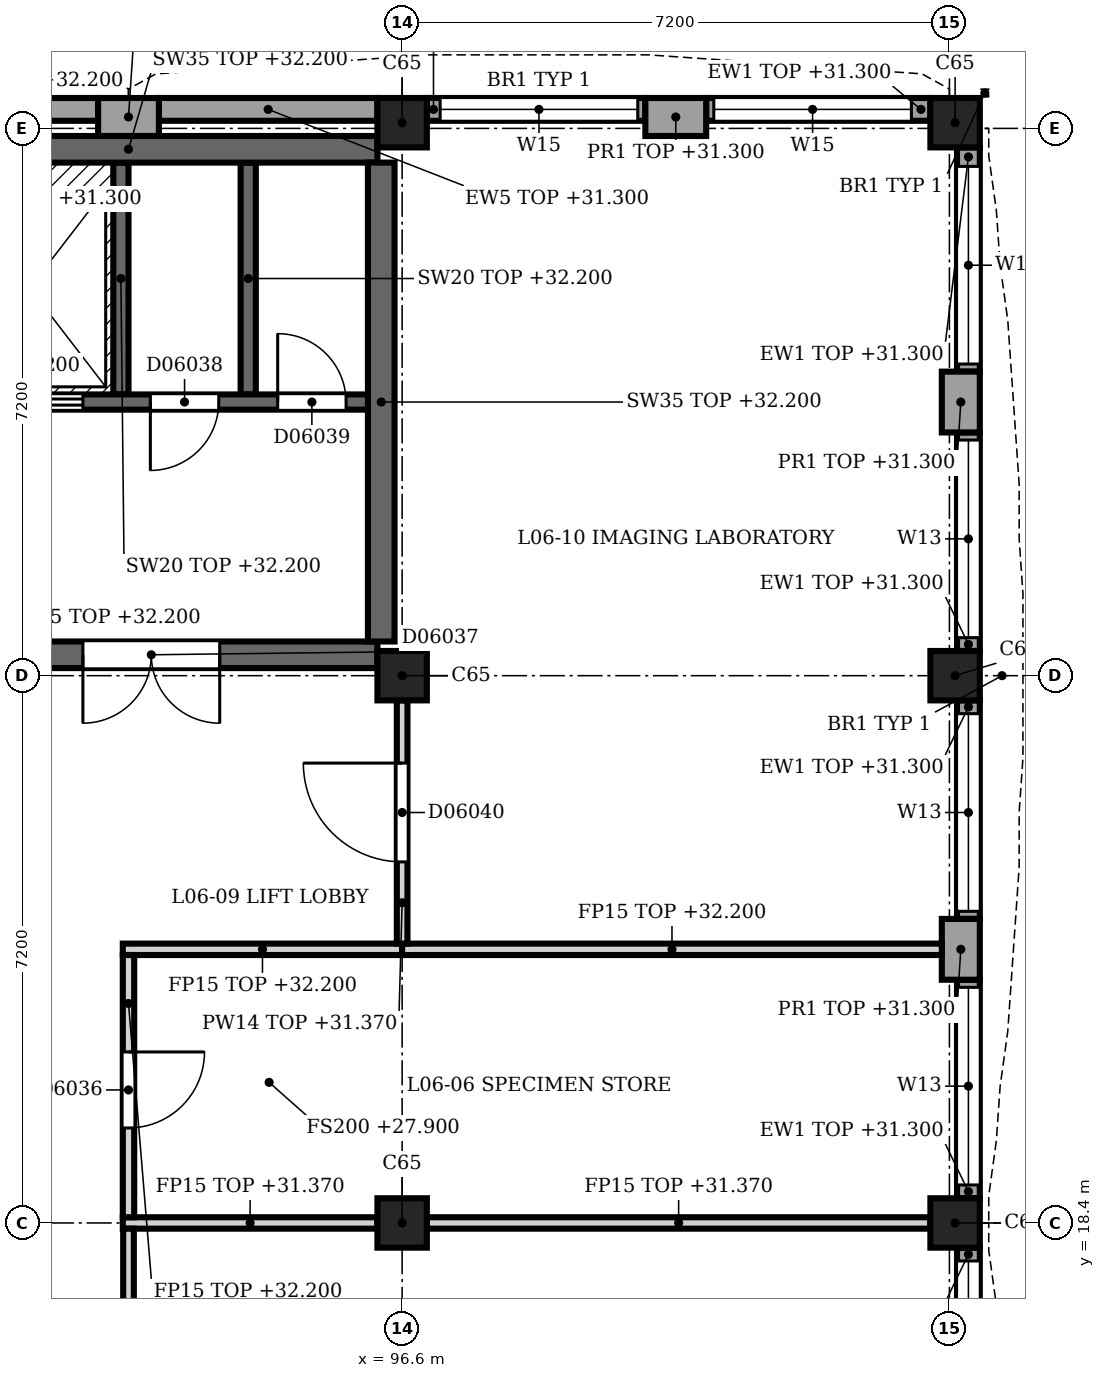
"""IFC4 building model, lengths in metres.
Left out: names, types, materials, properties, quantities, classifications, styles, units other than length and angle.
Written with IfcOpenShell. Run it as: python <this file> out.ifc"""

import sys

from ifc_helpers import new_model, si_unit, direction, frame, frame_2d, origin, origin_2d, place, context, subcontext, project, spatial, rectangle, extrude, element, fill, save


model = new_model("IFC4")
c1 = context("Model", 3, precision=1e-05, world=origin(), true_north=direction((0.0, 1.0)))
c2 = subcontext(c1, "Body", "Model", "MODEL_VIEW")
j1 = project(units=[si_unit("LENGTHUNIT", "METRE"), si_unit("PLANEANGLEUNIT", "RADIAN")], contexts=[c1])
p1 = place(None, origin())
s1 = spatial("IfcSite", under=j1, at=p1, CompositionType="ELEMENT")
p2 = place(p1, origin())
s2 = spatial("IfcBuilding", under=s1, at=p2, CompositionType="ELEMENT")
p3 = place(p2, frame((0.0, 0.0, 27.9)))
s3 = spatial("IfcBuildingStorey", under=s2, at=p3, CompositionType="ELEMENT", Elevation=27.9)
for number, where, z_axis, x_axis in (
    (1, (96.6, 18.4, 0.0), (0.0, 0.0, 1.0), (1.0, 0.0, 0.0)),
    (2, (96.6, 25.6, 0.0), (0.0, 0.0, 1.0), (1.0, 0.0, 0.0)),
    (3, (96.6, 32.875, 0.0), (0.0, 0.0, 1.0), (1.0, 0.0, 0.0)),
    (4, (103.875, 18.4, 0.0), (0.0, 0.0, 1.0), (1.0, 0.0, 0.0)),
    (5, (103.875, 25.6, 0.0), (0.0, 0.0, 1.0), (1.0, 0.0, 0.0)),
    (6, (103.875, 32.875, 0.0), (0.0, 0.0, 1.0), (1.0, 0.0, 0.0)),
):
    element("IfcColumn", number, at=place(p3, frame(where, z_axis=z_axis, x_axis=x_axis)), inside=s3, PredefinedType="COLUMN", context=c2, shape_type="SweptSolid", body=[
        extrude(rectangle(XDim=0.65, YDim=0.65, at=origin_2d()), origin(), (0.0, 0.0, 1.0), 4.5),
    ])
p4 = place(p3, frame((92.6, 32.95, 0.0), z_axis=(0.0, 0.0, 1.0), x_axis=(1.0, 0.0, 0.0)))
e7 = element("IfcWall", 7, at=p4, inside=s3, PredefinedType="SOLIDWALL", context=c2, shape_type="SweptSolid", body=[
    extrude(rectangle(XDim=0.8, YDim=0.5, at=frame_2d((0.4, 0.0))), origin(), (0.0, 0.0, 1.0), 3.4),
])
p5 = place(p3, frame((99.8, 32.95, 0.0), z_axis=(0.0, 0.0, 1.0), x_axis=(1.0, 0.0, 0.0)))
e8 = element("IfcWall", 8, at=p5, inside=s3, PredefinedType="SOLIDWALL", context=c2, shape_type="SweptSolid", body=[
    extrude(rectangle(XDim=0.8, YDim=0.5, at=frame_2d((0.4, 0.0))), origin(), (0.0, 0.0, 1.0), 3.4),
])
for number, where, z_axis, x_axis in (
    (9, (89.725, 33.05, 0.0), (0.0, 0.0, 1.0), (1.0, 0.0, 0.0)),
    (10, (93.4, 33.05, 0.0), (0.0, 0.0, 1.0), (1.0, 0.0, 0.0)),
):
    element("IfcWall", number, at=place(p3, frame(where, z_axis=z_axis, x_axis=x_axis)), inside=s3, PredefinedType="SOLIDWALL", context=c2, shape_type="SweptSolid", body=[
        extrude(rectangle(XDim=2.875, YDim=0.3, at=frame_2d((1.438, 0.0))), origin(), (0.0, 0.0, 1.0), 3.4),
    ])
p6 = place(p3, frame((96.925, 33.05, 0.0), z_axis=(0.0, 0.0, 1.0), x_axis=(1.0, 0.0, 0.0)))
e11 = element("IfcWall", 11, at=p6, inside=s3, PredefinedType="SOLIDWALL", context=c2, shape_type="SweptSolid", body=[
    extrude(rectangle(XDim=2.875, YDim=0.3, at=frame_2d((1.438, 0.0))), origin(), (0.0, 0.0, 1.0), 3.4),
])
p7 = place(p6, frame((0.175, 0.0, 1.0)))
e12 = element("IfcOpeningElement", 12, at=p7, cuts=e11, PredefinedType="OPENING", context=c2, shape_type="SweptSolid", body=[
    extrude(rectangle(XDim=2.6, YDim=2.0, at=frame_2d((1.3, 1.0))), frame((0.0, 0.16, 0.0), z_axis=(0.0, -1.0, 0.0), x_axis=(1.0, 0.0, 0.0)), (0.0, 0.0, 1.0), 0.32),
])
p8 = place(p3, frame((100.6, 33.05, 0.0), z_axis=(0.0, 0.0, 1.0), x_axis=(1.0, 0.0, 0.0)))
e13 = element("IfcWall", 13, at=p8, inside=s3, PredefinedType="SOLIDWALL", context=c2, shape_type="SweptSolid", body=[
    extrude(rectangle(XDim=2.95, YDim=0.3, at=frame_2d((1.475, 0.0))), origin(), (0.0, 0.0, 1.0), 3.4),
])
p9 = place(p8, frame((0.1, 0.0, 1.0)))
e14 = element("IfcOpeningElement", 14, at=p9, cuts=e13, PredefinedType="OPENING", context=c2, shape_type="SweptSolid", body=[
    extrude(rectangle(XDim=2.6, YDim=2.0, at=frame_2d((1.3, 1.0))), frame((0.0, 0.16, 0.0), z_axis=(0.0, -1.0, 0.0), x_axis=(1.0, 0.0, 0.0)), (0.0, 0.0, 1.0), 0.32),
])
p10 = place(p3, frame((103.95, 29.6, 0.0), z_axis=(0.0, 0.0, 1.0), x_axis=(0.0, -1.0, 0.0)))
e15 = element("IfcWall", 15, at=p10, inside=s3, PredefinedType="SOLIDWALL", context=c2, shape_type="SweptSolid", body=[
    extrude(rectangle(XDim=0.8, YDim=0.5, at=frame_2d((0.4, 0.0))), origin(), (0.0, 0.0, 1.0), 3.4),
])
p11 = place(p3, frame((103.95, 22.4, 0.0), z_axis=(0.0, 0.0, 1.0), x_axis=(0.0, -1.0, 0.0)))
e16 = element("IfcWall", 16, at=p11, inside=s3, PredefinedType="SOLIDWALL", context=c2, shape_type="SweptSolid", body=[
    extrude(rectangle(XDim=0.8, YDim=0.5, at=frame_2d((0.4, 0.0))), origin(), (0.0, 0.0, 1.0), 3.4),
])
p12 = place(p3, frame((104.05, 32.55, 0.0), z_axis=(0.0, 0.0, 1.0), x_axis=(0.0, -1.0, 0.0)))
e17 = element("IfcWall", 17, at=p12, inside=s3, PredefinedType="SOLIDWALL", context=c2, shape_type="SweptSolid", body=[
    extrude(rectangle(XDim=2.95, YDim=0.3, at=frame_2d((1.475, 0.0))), origin(), (0.0, 0.0, 1.0), 3.4),
])
p13 = place(p12, frame((0.25, 0.0, 0.9)))
e18 = element("IfcOpeningElement", 18, at=p13, cuts=e17, PredefinedType="OPENING", context=c2, shape_type="SweptSolid", body=[
    extrude(rectangle(XDim=2.6, YDim=2.2, at=frame_2d((1.3, 1.1))), frame((0.0, 0.16, 0.0), z_axis=(0.0, -1.0, 0.0), x_axis=(1.0, 0.0, 0.0)), (0.0, 0.0, 1.0), 0.32),
])
p14 = place(p3, frame((104.05, 28.8, 0.0), z_axis=(0.0, 0.0, 1.0), x_axis=(0.0, -1.0, 0.0)))
e19 = element("IfcWall", 19, at=p14, inside=s3, PredefinedType="SOLIDWALL", context=c2, shape_type="SweptSolid", body=[
    extrude(rectangle(XDim=2.875, YDim=0.3, at=frame_2d((1.438, 0.0))), origin(), (0.0, 0.0, 1.0), 3.4),
])
p15 = place(p14, frame((0.1, 0.0, 0.9)))
e20 = element("IfcOpeningElement", 20, at=p15, cuts=e19, PredefinedType="OPENING", context=c2, shape_type="SweptSolid", body=[
    extrude(rectangle(XDim=2.6, YDim=2.2, at=frame_2d((1.3, 1.1))), frame((0.0, 0.16, 0.0), z_axis=(0.0, -1.0, 0.0), x_axis=(1.0, 0.0, 0.0)), (0.0, 0.0, 1.0), 0.32),
])
p16 = place(p3, frame((104.05, 25.275, 0.0), z_axis=(0.0, 0.0, 1.0), x_axis=(0.0, -1.0, 0.0)))
e21 = element("IfcWall", 21, at=p16, inside=s3, PredefinedType="SOLIDWALL", context=c2, shape_type="SweptSolid", body=[
    extrude(rectangle(XDim=2.875, YDim=0.3, at=frame_2d((1.438, 0.0))), origin(), (0.0, 0.0, 1.0), 3.4),
])
p17 = place(p16, frame((0.175, 0.0, 0.9)))
e22 = element("IfcOpeningElement", 22, at=p17, cuts=e21, PredefinedType="OPENING", context=c2, shape_type="SweptSolid", body=[
    extrude(rectangle(XDim=2.6, YDim=2.2, at=frame_2d((1.3, 1.1))), frame((0.0, 0.16, 0.0), z_axis=(0.0, -1.0, 0.0), x_axis=(1.0, 0.0, 0.0)), (0.0, 0.0, 1.0), 0.32),
])
p18 = place(p3, frame((104.05, 21.6, 0.0), z_axis=(0.0, 0.0, 1.0), x_axis=(0.0, -1.0, 0.0)))
e23 = element("IfcWall", 23, at=p18, inside=s3, PredefinedType="SOLIDWALL", context=c2, shape_type="SweptSolid", body=[
    extrude(rectangle(XDim=2.875, YDim=0.3, at=frame_2d((1.438, 0.0))), origin(), (0.0, 0.0, 1.0), 3.4),
])
p19 = place(p18, frame((0.1, 0.0, 0.9)))
e24 = element("IfcOpeningElement", 24, at=p19, cuts=e23, PredefinedType="OPENING", context=c2, shape_type="SweptSolid", body=[
    extrude(rectangle(XDim=2.6, YDim=2.2, at=frame_2d((1.3, 1.1))), frame((0.0, 0.16, 0.0), z_axis=(0.0, -1.0, 0.0), x_axis=(1.0, 0.0, 0.0)), (0.0, 0.0, 1.0), 0.32),
])
p20 = place(p3, frame((104.05, 18.075, 0.0), z_axis=(0.0, 0.0, 1.0), x_axis=(0.0, -1.0, 0.0)))
e25 = element("IfcWall", 25, at=p20, inside=s3, PredefinedType="SOLIDWALL", context=c2, shape_type="SweptSolid", body=[
    extrude(rectangle(XDim=2.875, YDim=0.3, at=frame_2d((1.438, 0.0))), origin(), (0.0, 0.0, 1.0), 3.4),
])
p21 = place(p20, frame((0.175, 0.0, 0.9)))
e26 = element("IfcOpeningElement", 26, at=p21, cuts=e25, PredefinedType="OPENING", context=c2, shape_type="SweptSolid", body=[
    extrude(rectangle(XDim=2.6, YDim=2.2, at=frame_2d((1.3, 1.1))), frame((0.0, 0.16, 0.0), z_axis=(0.0, -1.0, 0.0), x_axis=(1.0, 0.0, 0.0)), (0.0, 0.0, 1.0), 0.32),
])
p22 = place(p3, frame((89.725, 25.875, 0.0), z_axis=(0.0, 0.0, 1.0), x_axis=(1.0, 0.0, 0.0)))
e27 = element("IfcWall", 27, at=p22, inside=s3, PredefinedType="SHEAR", context=c2, shape_type="SweptSolid", body=[
    extrude(rectangle(XDim=6.55, YDim=0.35, at=frame_2d((3.275, 0.0))), origin(), (0.0, 0.0, 1.0), 4.3),
])
p23 = place(p22, frame((2.675, 0.0, 0.0)))
e28 = element("IfcOpeningElement", 28, at=p23, cuts=e27, PredefinedType="OPENING", context=c2, shape_type="SweptSolid", body=[
    extrude(rectangle(XDim=1.8, YDim=2.1, at=frame_2d((0.9, 1.05))), frame((0.0, 0.185, 0.0), z_axis=(0.0, -1.0, 0.0), x_axis=(1.0, 0.0, 0.0)), (0.0, 0.0, 1.0), 0.37),
])
p24 = place(p3, frame((89.725, 32.525, 0.0), z_axis=(0.0, 0.0, 1.0), x_axis=(1.0, 0.0, 0.0)))
e29 = element("IfcWall", 29, at=p24, inside=s3, PredefinedType="SHEAR", context=c2, shape_type="SweptSolid", body=[
    extrude(rectangle(XDim=6.55, YDim=0.35, at=frame_2d((3.275, 0.0))), origin(), (0.0, 0.0, 1.0), 4.3),
])
p25 = place(p3, frame((96.325, 26.05, 0.0), z_axis=(0.0, 0.0, 1.0), x_axis=(0.0, 1.0, 0.0)))
e30 = element("IfcWall", 30, at=p25, inside=s3, PredefinedType="SHEAR", context=c2, shape_type="SweptSolid", body=[
    extrude(rectangle(XDim=6.3, YDim=0.35, at=frame_2d((3.15, 0.0))), origin(), (0.0, 0.0, 1.0), 4.3),
])
p26 = place(p3, frame((96.15, 29.2, 0.0), z_axis=(0.0, 0.0, 1.0), x_axis=(-1.0, 0.0, 0.0)))
e31 = element("IfcWall", 31, at=p26, inside=s3, PredefinedType="SHEAR", context=c2, shape_type="SweptSolid", body=[
    extrude(rectangle(XDim=10.35, YDim=0.2, at=frame_2d((5.175, 0.0))), origin(), (0.0, 0.0, 1.0), 4.3),
])
p27 = place(p26, frame((8.8, 0.0, 0.0)))
e32 = element("IfcOpeningElement", 32, at=p27, cuts=e31, PredefinedType="OPENING", context=c2, shape_type="SweptSolid", body=[
    extrude(rectangle(XDim=1.1, YDim=2.1, at=frame_2d((0.55, 1.05))), frame((0.0, 0.11, 0.0), z_axis=(0.0, -1.0, 0.0), x_axis=(1.0, 0.0, 0.0)), (0.0, 0.0, 1.0), 0.22),
])
p28 = place(p26, frame((6.6, 0.0, 0.0)))
e33 = element("IfcOpeningElement", 33, at=p28, cuts=e31, PredefinedType="OPENING", context=c2, shape_type="SweptSolid", body=[
    extrude(rectangle(XDim=1.1, YDim=2.1, at=frame_2d((0.55, 1.05))), frame((0.0, 0.11, 0.0), z_axis=(0.0, -1.0, 0.0), x_axis=(1.0, 0.0, 0.0)), (0.0, 0.0, 1.0), 0.22),
])
p29 = place(p26, frame((3.75, 0.0, 0.0)))
e34 = element("IfcOpeningElement", 34, at=p29, cuts=e31, PredefinedType="OPENING", context=c2, shape_type="SweptSolid", body=[
    extrude(rectangle(XDim=1.4, YDim=2.1, at=frame_2d((0.7, 1.05))), frame((0.0, 0.11, 0.0), z_axis=(0.0, -1.0, 0.0), x_axis=(1.0, 0.0, 0.0)), (0.0, 0.0, 1.0), 0.22),
])
p30 = place(p26, frame((1.962, 0.0, 0.0)))
e35 = element("IfcOpeningElement", 35, at=p30, cuts=e31, PredefinedType="OPENING", context=c2, shape_type="SweptSolid", body=[
    extrude(rectangle(XDim=0.9, YDim=2.1, at=frame_2d((0.45, 1.05))), frame((0.0, 0.11, 0.0), z_axis=(0.0, -1.0, 0.0), x_axis=(1.0, 0.0, 0.0)), (0.0, 0.0, 1.0), 0.22),
])
p31 = place(p26, frame((0.288, 0.0, 0.0)))
e36 = element("IfcOpeningElement", 36, at=p31, cuts=e31, PredefinedType="OPENING", context=c2, shape_type="SweptSolid", body=[
    extrude(rectangle(XDim=0.9, YDim=2.1, at=frame_2d((0.45, 1.05))), frame((0.0, 0.11, 0.0), z_axis=(0.0, -1.0, 0.0), x_axis=(1.0, 0.0, 0.0)), (0.0, 0.0, 1.0), 0.22),
])
for number, where, z_axis, x_axis in (
    (37, (92.9, 29.3, 0.0), (0.0, 0.0, 1.0), (0.0, 1.0, 0.0)),
    (38, (94.575, 29.3, 0.0), (0.0, 0.0, 1.0), (0.0, 1.0, 0.0)),
):
    element("IfcWall", number, at=place(p3, frame(where, z_axis=z_axis, x_axis=x_axis)), inside=s3, PredefinedType="SHEAR", context=c2, shape_type="SweptSolid", body=[
        extrude(rectangle(XDim=3.05, YDim=0.2, at=frame_2d((1.525, 0.0))), origin(), (0.0, 0.0, 1.0), 4.3),
    ])
p32 = place(p3, frame((92.925, 18.4, 0.0), z_axis=(0.0, 0.0, 1.0), x_axis=(1.0, 0.0, 0.0)))
e39 = element("IfcWall", 39, at=p32, inside=s3, PredefinedType="PARTITIONING", context=c2, shape_type="SweptSolid", body=[
    extrude(rectangle(XDim=3.35, YDim=0.15, at=frame_2d((1.675, 0.0))), origin(), (0.0, 0.0, 1.0), 3.47),
])
p33 = place(p3, frame((96.925, 18.4, 0.0), z_axis=(0.0, 0.0, 1.0), x_axis=(1.0, 0.0, 0.0)))
e40 = element("IfcWall", 40, at=p33, inside=s3, PredefinedType="PARTITIONING", context=c2, shape_type="SweptSolid", body=[
    extrude(rectangle(XDim=6.625, YDim=0.15, at=frame_2d((3.312, 0.0))), origin(), (0.0, 0.0, 1.0), 3.47),
])
p34 = place(p3, frame((92.925, 22.0, 0.0), z_axis=(0.0, 0.0, 1.0), x_axis=(1.0, 0.0, 0.0)))
e41 = element("IfcWall", 41, at=p34, inside=s3, PredefinedType="PARTITIONING", context=c2, shape_type="SweptSolid", body=[
    extrude(rectangle(XDim=3.675, YDim=0.15, at=frame_2d((1.837, 0.0))), origin(), (0.0, 0.0, 1.0), 4.3),
])
p35 = place(p3, frame((96.6, 22.0, 0.0), z_axis=(0.0, 0.0, 1.0), x_axis=(1.0, 0.0, 0.0)))
e42 = element("IfcWall", 42, at=p35, inside=s3, PredefinedType="PARTITIONING", context=c2, shape_type="SweptSolid", body=[
    extrude(rectangle(XDim=7.1, YDim=0.15, at=frame_2d((3.55, 0.0))), origin(), (0.0, 0.0, 1.0), 4.3),
])
p36 = place(p3, frame((93.0, 18.325, 0.0), z_axis=(0.0, 0.0, 1.0), x_axis=(0.0, -1.0, 0.0)))
e43 = element("IfcWall", 43, at=p36, inside=s3, PredefinedType="PARTITIONING", context=c2, shape_type="SweptSolid", body=[
    extrude(rectangle(XDim=10.655, YDim=0.14, at=frame_2d((5.328, 0.0))), origin(), (0.0, 0.0, 1.0), 3.87),
])
p37 = place(p36, frame((4.775, 0.0, 0.0)))
e44 = element("IfcOpeningElement", 44, at=p37, cuts=e43, PredefinedType="OPENING", context=c2, shape_type="SweptSolid", body=[
    extrude(rectangle(XDim=1.1, YDim=2.2, at=frame_2d((0.55, 1.1))), frame((0.0, 0.08, 0.0), z_axis=(0.0, -1.0, 0.0), x_axis=(1.0, 0.0, 0.0)), (0.0, 0.0, 1.0), 0.16),
])
p38 = place(p3, frame((93.0, 21.925, 0.0), z_axis=(0.0, 0.0, 1.0), x_axis=(0.0, -1.0, 0.0)))
e45 = element("IfcWall", 45, at=p38, inside=s3, PredefinedType="PARTITIONING", context=c2, shape_type="SweptSolid", body=[
    extrude(rectangle(XDim=3.45, YDim=0.15, at=frame_2d((1.725, 0.0))), origin(), (0.0, 0.0, 1.0), 4.3),
])
p39 = place(p38, frame((1.275, 0.0, 0.0)))
e46 = element("IfcOpeningElement", 46, at=p39, cuts=e45, PredefinedType="OPENING", context=c2, shape_type="SweptSolid", body=[
    extrude(rectangle(XDim=1.0, YDim=2.1, at=frame_2d((0.5, 1.05))), frame((0.0, 0.085, 0.0), z_axis=(0.0, -1.0, 0.0), x_axis=(1.0, 0.0, 0.0)), (0.0, 0.0, 1.0), 0.17),
])
p40 = place(p3, frame((96.6, 25.275, 0.0), z_axis=(0.0, 0.0, 1.0), x_axis=(0.0, -1.0, 0.0)))
e47 = element("IfcWall", 47, at=p40, inside=s3, PredefinedType="PARTITIONING", context=c2, shape_type="SweptSolid", body=[
    extrude(rectangle(XDim=3.2, YDim=0.14, at=frame_2d((1.6, 0.0))), origin(), (0.0, 0.0, 1.0), 3.47),
])
p41 = place(p40, frame((0.825, 0.0, 0.0)))
e48 = element("IfcOpeningElement", 48, at=p41, cuts=e47, PredefinedType="OPENING", context=c2, shape_type="SweptSolid", body=[
    extrude(rectangle(XDim=1.3, YDim=2.1, at=frame_2d((0.65, 1.05))), frame((0.0, 0.08, 0.0), z_axis=(0.0, -1.0, 0.0), x_axis=(1.0, 0.0, 0.0)), (0.0, 0.0, 1.0), 0.16),
])
p42 = place(p7, origin())
e49 = element("IfcWindow", 49, at=p42, inside=s3, PartitioningType="SINGLE_PANEL", PredefinedType="WINDOW", context=c2, shape_type="SweptSolid", body=[
    extrude(rectangle(XDim=2.6, YDim=2.0, at=frame_2d((1.3, 1.0))), frame((0.0, 0.03, 0.0), z_axis=(0.0, -1.0, 0.0), x_axis=(1.0, 0.0, 0.0)), (0.0, 0.0, 1.0), 0.06),
])
fill(e12, e49)
p43 = place(p9, origin())
e50 = element("IfcWindow", 50, at=p43, inside=s3, PartitioningType="SINGLE_PANEL", PredefinedType="WINDOW", context=c2, shape_type="SweptSolid", body=[
    extrude(rectangle(XDim=2.6, YDim=2.0, at=frame_2d((1.3, 1.0))), frame((0.0, 0.03, 0.0), z_axis=(0.0, -1.0, 0.0), x_axis=(1.0, 0.0, 0.0)), (0.0, 0.0, 1.0), 0.06),
])
fill(e14, e50)
p44 = place(p13, origin())
e51 = element("IfcWindow", 51, at=p44, inside=s3, PartitioningType="SINGLE_PANEL", PredefinedType="WINDOW", context=c2, shape_type="SweptSolid", body=[
    extrude(rectangle(XDim=2.6, YDim=2.2, at=frame_2d((1.3, 1.1))), frame((0.0, 0.03, 0.0), z_axis=(0.0, -1.0, 0.0), x_axis=(1.0, 0.0, 0.0)), (0.0, 0.0, 1.0), 0.06),
])
fill(e18, e51)
p45 = place(p15, origin())
e52 = element("IfcWindow", 52, at=p45, inside=s3, PartitioningType="SINGLE_PANEL", PredefinedType="WINDOW", context=c2, shape_type="SweptSolid", body=[
    extrude(rectangle(XDim=2.6, YDim=2.2, at=frame_2d((1.3, 1.1))), frame((0.0, 0.03, 0.0), z_axis=(0.0, -1.0, 0.0), x_axis=(1.0, 0.0, 0.0)), (0.0, 0.0, 1.0), 0.06),
])
fill(e20, e52)
p46 = place(p17, origin())
e53 = element("IfcWindow", 53, at=p46, inside=s3, PartitioningType="SINGLE_PANEL", PredefinedType="WINDOW", context=c2, shape_type="SweptSolid", body=[
    extrude(rectangle(XDim=2.6, YDim=2.2, at=frame_2d((1.3, 1.1))), frame((0.0, 0.03, 0.0), z_axis=(0.0, -1.0, 0.0), x_axis=(1.0, 0.0, 0.0)), (0.0, 0.0, 1.0), 0.06),
])
fill(e22, e53)
p47 = place(p19, origin())
e54 = element("IfcWindow", 54, at=p47, inside=s3, PartitioningType="SINGLE_PANEL", PredefinedType="WINDOW", context=c2, shape_type="SweptSolid", body=[
    extrude(rectangle(XDim=2.6, YDim=2.2, at=frame_2d((1.3, 1.1))), frame((0.0, 0.03, 0.0), z_axis=(0.0, -1.0, 0.0), x_axis=(1.0, 0.0, 0.0)), (0.0, 0.0, 1.0), 0.06),
])
fill(e24, e54)
p48 = place(p21, origin())
e55 = element("IfcWindow", 55, at=p48, inside=s3, PartitioningType="SINGLE_PANEL", PredefinedType="WINDOW", context=c2, shape_type="SweptSolid", body=[
    extrude(rectangle(XDim=2.6, YDim=2.2, at=frame_2d((1.3, 1.1))), frame((0.0, 0.03, 0.0), z_axis=(0.0, -1.0, 0.0), x_axis=(1.0, 0.0, 0.0)), (0.0, 0.0, 1.0), 0.06),
])
fill(e26, e55)
p49 = place(p23, origin())
e56 = element("IfcDoor", 56, at=p49, inside=s3, OperationType="SINGLE_SWING_LEFT", PredefinedType="DOOR", context=c2, shape_type="SweptSolid", body=[
    extrude(rectangle(XDim=1.8, YDim=2.1, at=frame_2d((0.9, 1.05))), frame((0.0, 0.025, 0.0), z_axis=(0.0, -1.0, 0.0), x_axis=(1.0, 0.0, 0.0)), (0.0, 0.0, 1.0), 0.05),
])
fill(e28, e56)
p50 = place(p29, origin())
e57 = element("IfcDoor", 57, at=p50, inside=s3, OperationType="DOUBLE_DOOR_SLIDING", PredefinedType="DOOR", context=c2, shape_type="SweptSolid", body=[
    extrude(rectangle(XDim=1.4, YDim=2.1, at=frame_2d((0.7, 1.05))), frame((0.0, 0.025, 0.0), z_axis=(0.0, -1.0, 0.0), x_axis=(1.0, 0.0, 0.0)), (0.0, 0.0, 1.0), 0.05),
])
fill(e34, e57)
p51 = place(p30, origin())
e58 = element("IfcDoor", 58, at=p51, inside=s3, OperationType="SINGLE_SWING_LEFT", PredefinedType="DOOR", context=c2, shape_type="SweptSolid", body=[
    extrude(rectangle(XDim=0.9, YDim=2.1, at=frame_2d((0.45, 1.05))), frame((0.0, 0.025, 0.0), z_axis=(0.0, -1.0, 0.0), x_axis=(1.0, 0.0, 0.0)), (0.0, 0.0, 1.0), 0.05),
])
fill(e35, e58)
p52 = place(p31, origin())
e59 = element("IfcDoor", 59, at=p52, inside=s3, OperationType="SINGLE_SWING_LEFT", PredefinedType="DOOR", context=c2, shape_type="SweptSolid", body=[
    extrude(rectangle(XDim=0.9, YDim=2.1, at=frame_2d((0.45, 1.05))), frame((0.0, 0.025, 0.0), z_axis=(0.0, -1.0, 0.0), x_axis=(1.0, 0.0, 0.0)), (0.0, 0.0, 1.0), 0.05),
])
fill(e36, e59)
p53 = place(p39, origin())
e60 = element("IfcDoor", 60, at=p53, inside=s3, OperationType="SINGLE_SWING_RIGHT", PredefinedType="DOOR", context=c2, shape_type="SweptSolid", body=[
    extrude(rectangle(XDim=1.0, YDim=2.1, at=frame_2d((0.5, 1.05))), frame((0.0, 0.025, 0.0), z_axis=(0.0, -1.0, 0.0), x_axis=(1.0, 0.0, 0.0)), (0.0, 0.0, 1.0), 0.05),
])
fill(e46, e60)
p54 = place(p41, origin())
e61 = element("IfcDoor", 61, at=p54, inside=s3, OperationType="SINGLE_SWING_LEFT", PredefinedType="DOOR", context=c2, shape_type="SweptSolid", body=[
    extrude(rectangle(XDim=1.3, YDim=2.1, at=frame_2d((0.65, 1.05))), frame((0.0, 0.025, 0.0), z_axis=(0.0, -1.0, 0.0), x_axis=(1.0, 0.0, 0.0)), (0.0, 0.0, 1.0), 0.05),
])
fill(e48, e61)
save(model, sys.argv[1])
